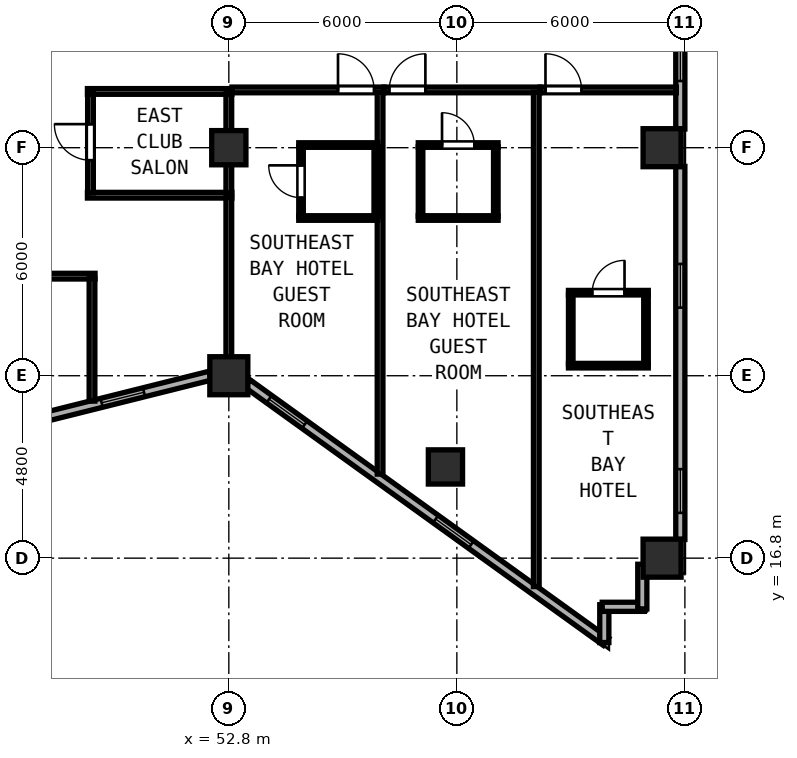
"""IFC4 building model, lengths in metres.
Left out: names, types, materials, properties, quantities, classifications, styles, units other than length and angle.
Written with IfcOpenShell. Run it as: python <this file> out.ifc"""

import sys

from ifc_helpers import new_model, si_unit, direction, frame, frame_2d, origin, origin_2d, place, context, subcontext, project, spatial, rectangle, hollow_rectangle, extrude, element, fill, save


model = new_model("IFC4")
c1 = context("Model", 3, precision=1e-05, world=origin(), true_north=direction((0.0, 1.0)))
c2 = subcontext(c1, "Body", "Model", "MODEL_VIEW")
j1 = project(units=[si_unit("LENGTHUNIT", "METRE"), si_unit("PLANEANGLEUNIT", "RADIAN")], contexts=[c1])
p1 = place(None, origin())
s1 = spatial("IfcSite", under=j1, at=p1, CompositionType="ELEMENT")
p2 = place(p1, origin())
s2 = spatial("IfcBuilding", under=s1, at=p2, CompositionType="ELEMENT")
p3 = place(p2, frame((0.0, 0.0, 121.2)))
s3 = spatial("IfcBuildingStorey", under=s2, at=p3, CompositionType="ELEMENT", Elevation=121.2)
for number, where, z_axis, x_axis in (
    (1, (52.8, 21.6, 0.0), (0.0, 0.0, 1.0), (1.0, 0.0, 0.0)),
    (2, (64.2, 16.8, 0.0), (0.0, 0.0, 1.0), (1.0, 0.0, 0.0)),
    (3, (64.2, 27.6, 0.0), (0.0, 0.0, 1.0), (1.0, 0.0, 0.0)),
):
    element("IfcColumn", number, at=place(p3, frame(where, z_axis=z_axis, x_axis=x_axis)), inside=s3, PredefinedType="COLUMN", context=c2, shape_type="SweptSolid", body=[
        extrude(hollow_rectangle(XDim=1.0, YDim=1.0, WallThickness=0.038, at=origin_2d()), origin(), (0.0, 0.0, 1.0), 3.8),
    ])
for number, where, z_axis, x_axis in (
    (4, (52.8, 27.6, 0.0), (0.0, 0.0, 1.0), (1.0, 0.0, 0.0)),
    (5, (58.5, 19.2, 0.0), (0.0, 0.0, 1.0), (1.0, 0.0, 0.0)),
):
    element("IfcColumn", number, at=place(p3, frame(where, z_axis=z_axis, x_axis=x_axis)), inside=s3, PredefinedType="COLUMN", context=c2, shape_type="SweptSolid", body=[
        extrude(hollow_rectangle(XDim=0.9, YDim=0.9, WallThickness=0.034, at=origin_2d()), origin(), (0.0, 0.0, 1.0), 3.8),
    ])
p4 = place(p3, frame((47.932, 20.507, 0.0), z_axis=(0.0, 0.0, 1.0), x_axis=(0.970145683738, 0.242522890311, 0.0)))
e6 = element("IfcWall", 6, at=p4, inside=s3, PredefinedType="SOLIDWALL", context=c2, shape_type="SweptSolid", body=[
    extrude(rectangle(XDim=4.511, YDim=0.24, at=frame_2d((2.255, 0.0))), origin(), (0.0, 0.0, 1.0), 3.145),
])
p5 = place(p4, frame((1.569, 0.0, 0.85)))
e7 = element("IfcOpeningElement", 7, at=p5, cuts=e6, PredefinedType="OPENING", context=c2, shape_type="SweptSolid", body=[
    extrude(rectangle(XDim=1.15, YDim=1.8, at=frame_2d((0.575, 0.9))), frame((0.0, 0.13, 0.0), z_axis=(0.0, -1.0, 0.0), x_axis=(1.0, 0.0, 0.0)), (0.0, 0.0, 1.0), 0.26),
])
p6 = place(p3, frame((53.292, 21.394, 0.0), z_axis=(0.0, 0.0, 1.0), x_axis=(0.811543504691, -0.584291998913, 0.0)))
e8 = element("IfcWall", 8, at=p6, inside=s3, PredefinedType="SOLIDWALL", context=c2, shape_type="SweptSolid", body=[
    extrude(rectangle(XDim=11.623, YDim=0.24, at=frame_2d((5.812, 0.0))), origin(), (0.0, 0.0, 1.0), 3.145),
])
p7 = place(p6, frame((0.7, 0.0, 0.85)))
e9 = element("IfcOpeningElement", 9, at=p7, cuts=e8, PredefinedType="OPENING", context=c2, shape_type="SweptSolid", body=[
    extrude(rectangle(XDim=1.15, YDim=1.8, at=frame_2d((0.575, 0.9))), frame((0.0, 0.13, 0.0), z_axis=(0.0, -1.0, 0.0), x_axis=(1.0, 0.0, 0.0)), (0.0, 0.0, 1.0), 0.26),
])
p8 = place(p6, frame((6.1, 0.0, 0.85)))
e10 = element("IfcOpeningElement", 10, at=p8, cuts=e8, PredefinedType="OPENING", context=c2, shape_type="SweptSolid", body=[
    extrude(rectangle(XDim=1.15, YDim=1.8, at=frame_2d((0.575, 0.9))), frame((0.0, 0.13, 0.0), z_axis=(0.0, -1.0, 0.0), x_axis=(1.0, 0.0, 0.0)), (0.0, 0.0, 1.0), 0.26),
])
p9 = place(p3, frame((62.68, 14.579, 0.0), z_axis=(0.0, 0.0, 1.0), x_axis=(0.0, 1.0, 0.0)))
e11 = element("IfcWall", 11, at=p9, inside=s3, PredefinedType="SOLIDWALL", context=c2, shape_type="SweptSolid", body=[
    extrude(rectangle(XDim=0.996, YDim=0.24, at=frame_2d((0.498, 0.0))), origin(), (0.0, 0.0, 1.0), 3.6),
])
p10 = place(p3, frame((62.625, 15.52, 0.0), z_axis=(0.0, 0.0, 1.0), x_axis=(1.0, 0.0, 0.0)))
e12 = element("IfcWall", 12, at=p10, inside=s3, PredefinedType="SOLIDWALL", context=c2, shape_type="SweptSolid", body=[
    extrude(rectangle(XDim=1.11, YDim=0.24, at=frame_2d((0.555, 0.0))), origin(), (0.0, 0.0, 1.0), 3.6),
])
p11 = place(p3, frame((63.68, 15.465, 0.0), z_axis=(0.0, 0.0, 1.0), x_axis=(0.0, 1.0, 0.0)))
e13 = element("IfcWall", 13, at=p11, inside=s3, PredefinedType="SOLIDWALL", context=c2, shape_type="SweptSolid", body=[
    extrude(rectangle(XDim=1.175, YDim=0.24, at=frame_2d((0.587, 0.0))), origin(), (0.0, 0.0, 1.0), 3.6),
])
p12 = place(p3, frame((64.68, 17.292, 0.0), z_axis=(0.0, 0.0, 1.0), x_axis=(0.0, 1.0, 0.0)))
e14 = element("IfcWall", 14, at=p12, inside=s3, PredefinedType="SOLIDWALL", context=c2, shape_type="SweptSolid", body=[
    extrude(rectangle(XDim=9.816, YDim=0.24, at=frame_2d((4.908, 0.0))), origin(), (0.0, 0.0, 1.0), 3.6),
])
p13 = place(p12, frame((0.7, 0.0, 0.85)))
e15 = element("IfcOpeningElement", 15, at=p13, cuts=e14, PredefinedType="OPENING", context=c2, shape_type="SweptSolid", body=[
    extrude(rectangle(XDim=1.15, YDim=1.8, at=frame_2d((0.575, 0.9))), frame((0.0, 0.13, 0.0), z_axis=(0.0, -1.0, 0.0), x_axis=(1.0, 0.0, 0.0)), (0.0, 0.0, 1.0), 0.26),
])
p14 = place(p12, frame((6.1, 0.0, 0.85)))
e16 = element("IfcOpeningElement", 16, at=p14, cuts=e14, PredefinedType="OPENING", context=c2, shape_type="SweptSolid", body=[
    extrude(rectangle(XDim=1.15, YDim=1.8, at=frame_2d((0.575, 0.9))), frame((0.0, 0.13, 0.0), z_axis=(0.0, -1.0, 0.0), x_axis=(1.0, 0.0, 0.0)), (0.0, 0.0, 1.0), 0.26),
])
p15 = place(p3, frame((64.68, 28.092, 0.0), z_axis=(0.0, 0.0, 1.0), x_axis=(0.0, 1.0, 0.0)))
e17 = element("IfcWall", 17, at=p15, inside=s3, PredefinedType="SOLIDWALL", context=c2, shape_type="SweptSolid", body=[
    extrude(rectangle(XDim=9.443, YDim=0.24, at=frame_2d((4.721, 0.0))), origin(), (0.0, 0.0, 1.0), 3.6),
])
p16 = place(p15, frame((1.263, 0.0, 0.85)))
e18 = element("IfcOpeningElement", 18, at=p16, cuts=e17, PredefinedType="OPENING", context=c2, shape_type="SweptSolid", body=[
    extrude(rectangle(XDim=1.15, YDim=1.8, at=frame_2d((0.575, 0.9))), frame((0.0, 0.13, 0.0), z_axis=(0.0, -1.0, 0.0), x_axis=(1.0, 0.0, 0.0)), (0.0, 0.0, 1.0), 0.26),
])
p17 = place(p15, frame((6.1, 0.0, 0.85)))
e19 = element("IfcOpeningElement", 19, at=p17, cuts=e17, PredefinedType="OPENING", context=c2, shape_type="SweptSolid", body=[
    extrude(rectangle(XDim=1.15, YDim=1.8, at=frame_2d((0.575, 0.9))), frame((0.0, 0.13, 0.0), z_axis=(0.0, -1.0, 0.0), x_axis=(1.0, 0.0, 0.0)), (0.0, 0.0, 1.0), 0.26),
])
for number, where, z_axis, x_axis in (
    (20, (49.08, 29.08, 0.0), (0.0, 0.0, 1.0), (1.0, 0.0, 0.0)),
    (21, (49.08, 26.35, 0.0), (0.0, 0.0, 1.0), (1.0, 0.0, 0.0)),
):
    element("IfcWall", number, at=place(p3, frame(where, z_axis=z_axis, x_axis=x_axis)), inside=s3, PredefinedType="PARTITIONING", context=c2, shape_type="SweptSolid", body=[
        extrude(rectangle(XDim=3.8, YDim=0.15, at=frame_2d((1.9, 0.0))), origin(), (0.0, 0.0, 1.0), 3.6),
    ])
p18 = place(p3, frame((49.16, 26.41, 0.0), z_axis=(0.0, 0.0, 1.0), x_axis=(0.0, 1.0, 0.0)))
e22 = element("IfcWall", 22, at=p18, inside=s3, PredefinedType="PARTITIONING", context=c2, shape_type="SweptSolid", body=[
    extrude(rectangle(XDim=2.61, YDim=0.15, at=frame_2d((1.305, 0.0))), origin(), (0.0, 0.0, 1.0), 3.6),
])
p19 = place(p18, frame((0.86, 0.0, 0.0)))
e23 = element("IfcOpeningElement", 23, at=p19, cuts=e22, PredefinedType="OPENING", context=c2, shape_type="SweptSolid", body=[
    extrude(rectangle(XDim=0.95, YDim=2.12, at=frame_2d((0.475, 1.06))), frame((0.0, 0.085, 0.0), z_axis=(0.0, -1.0, 0.0), x_axis=(1.0, 0.0, 0.0)), (0.0, 0.0, 1.0), 0.17),
])
p20 = place(p3, frame((52.8, 26.41, 0.0), z_axis=(0.0, 0.0, 1.0), x_axis=(0.0, 1.0, 0.0)))
e24 = element("IfcWall", 24, at=p20, inside=s3, PredefinedType="PARTITIONING", context=c2, shape_type="SweptSolid", body=[
    extrude(rectangle(XDim=2.61, YDim=0.15, at=frame_2d((1.305, 0.0))), origin(), (0.0, 0.0, 1.0), 3.145),
])
p21 = place(p3, frame((45.682, 24.22, 0.0), z_axis=(0.0, 0.0, 1.0), x_axis=(1.0, 0.0, 0.0)))
e25 = element("IfcWall", 25, at=p21, inside=s3, PredefinedType="PARTITIONING", context=c2, shape_type="SweptSolid", body=[
    extrude(rectangle(XDim=3.598, YDim=0.15, at=frame_2d((1.799, 0.0))), origin(), (0.0, 0.0, 1.0), 3.6),
])
p22 = place(p21, frame((2.113, 0.0, 0.0), z_axis=(0.0, 0.0, 1.0), x_axis=(-1.0, 0.0, 0.0)))
e26 = element("IfcOpeningElement", 26, at=p22, cuts=e25, PredefinedType="OPENING", context=c2, shape_type="SweptSolid", body=[
    extrude(rectangle(XDim=0.95, YDim=2.12, at=frame_2d((0.475, 1.06))), frame((0.0, 0.085, 0.0), z_axis=(0.0, -1.0, 0.0), x_axis=(1.0, 0.0, 0.0)), (0.0, 0.0, 1.0), 0.17),
])
p23 = place(p3, frame((49.2, 20.932, 0.0), z_axis=(0.0, 0.0, 1.0), x_axis=(0.0, 1.0, 0.0)))
e27 = element("IfcWall", 27, at=p23, inside=s3, PredefinedType="PARTITIONING", context=c2, shape_type="SweptSolid", body=[
    extrude(rectangle(XDim=3.228, YDim=0.15, at=frame_2d((1.614, 0.0))), origin(), (0.0, 0.0, 1.0), 3.6),
])
p24 = place(p3, frame((52.882, 29.12, 0.0), z_axis=(0.0, 0.0, 1.0), x_axis=(1.0, 0.0, 0.0)))
e28 = element("IfcWall", 28, at=p24, inside=s3, PredefinedType="PARTITIONING", context=c2, shape_type="SweptSolid", body=[
    extrude(rectangle(XDim=3.998, YDim=0.15, at=frame_2d((1.999, 0.0))), origin(), (0.0, 0.0, 1.0), 3.6),
])
p25 = place(p24, frame((3.74, 0.0, 0.0), z_axis=(0.0, 0.0, 1.0), x_axis=(-1.0, 0.0, 0.0)))
e29 = element("IfcOpeningElement", 29, at=p25, cuts=e28, PredefinedType="OPENING", context=c2, shape_type="SweptSolid", body=[
    extrude(rectangle(XDim=0.95, YDim=2.15, at=frame_2d((0.475, 1.075))), frame((0.0, 0.085, 0.0), z_axis=(0.0, -1.0, 0.0), x_axis=(1.0, 0.0, 0.0)), (0.0, 0.0, 1.0), 0.17),
])
p26 = place(p3, frame((52.8, 21.819, 0.0), z_axis=(0.0, 0.0, 1.0), x_axis=(0.0, 1.0, 0.0)))
e30 = element("IfcWall", 30, at=p26, inside=s3, PredefinedType="PARTITIONING", context=c2, shape_type="SweptSolid", body=[
    extrude(rectangle(XDim=4.471, YDim=0.15, at=frame_2d((2.236, 0.0))), origin(), (0.0, 0.0, 1.0), 3.145),
])
p27 = place(p3, frame((56.78, 19.012, 0.0), z_axis=(0.0, 0.0, 1.0), x_axis=(0.0, 1.0, 0.0)))
e31 = element("IfcWall", 31, at=p27, inside=s3, PredefinedType="PARTITIONING", context=c2, shape_type="SweptSolid", body=[
    extrude(rectangle(XDim=10.048, YDim=0.15, at=frame_2d((5.024, 0.0))), origin(), (0.0, 0.0, 1.0), 3.6),
])
p28 = place(p3, frame((54.64, 27.67, 0.0), z_axis=(0.0, 0.0, 1.0), x_axis=(1.0, 0.0, 0.0)))
e32 = element("IfcWall", 32, at=p28, inside=s3, PredefinedType="PARTITIONING", context=c2, shape_type="SweptSolid", body=[
    extrude(rectangle(XDim=2.08, YDim=0.12, at=frame_2d((1.04, 0.0))), origin(), (0.0, 0.0, 1.0), 3.145),
])
p29 = place(p3, frame((54.64, 25.75, 0.0), z_axis=(0.0, 0.0, 1.0), x_axis=(1.0, 0.0, 0.0)))
e33 = element("IfcWall", 33, at=p29, inside=s3, PredefinedType="PARTITIONING", context=c2, shape_type="SweptSolid", body=[
    extrude(rectangle(XDim=2.08, YDim=0.12, at=frame_2d((1.04, 0.0))), origin(), (0.0, 0.0, 1.0), 3.6),
])
p30 = place(p3, frame((54.7, 25.795, 0.0), z_axis=(0.0, 0.0, 1.0), x_axis=(0.0, 1.0, 0.0)))
e34 = element("IfcWall", 34, at=p30, inside=s3, PredefinedType="PARTITIONING", context=c2, shape_type="SweptSolid", body=[
    extrude(rectangle(XDim=1.83, YDim=0.12, at=frame_2d((0.915, 0.0))), origin(), (0.0, 0.0, 1.0), 3.6),
])
p31 = place(p30, frame((1.34, 0.0, 0.0), z_axis=(0.0, 0.0, 1.0), x_axis=(-1.0, 0.0, 0.0)))
e35 = element("IfcOpeningElement", 35, at=p31, cuts=e34, PredefinedType="OPENING", context=c2, shape_type="SweptSolid", body=[
    extrude(rectangle(XDim=0.85, YDim=2.1, at=frame_2d((0.425, 1.05))), frame((0.0, 0.07, 0.0), z_axis=(0.0, -1.0, 0.0), x_axis=(1.0, 0.0, 0.0)), (0.0, 0.0, 1.0), 0.14),
])
p32 = place(p3, frame((56.68, 25.795, 0.0), z_axis=(0.0, 0.0, 1.0), x_axis=(0.0, 1.0, 0.0)))
e36 = element("IfcWall", 36, at=p32, inside=s3, PredefinedType="PARTITIONING", context=c2, shape_type="SweptSolid", body=[
    extrude(rectangle(XDim=1.83, YDim=0.12, at=frame_2d((0.915, 0.0))), origin(), (0.0, 0.0, 1.0), 3.6),
])
p33 = place(p3, frame((56.882, 29.12, 0.0), z_axis=(0.0, 0.0, 1.0), x_axis=(1.0, 0.0, 0.0)))
e37 = element("IfcWall", 37, at=p33, inside=s3, PredefinedType="PARTITIONING", context=c2, shape_type="SweptSolid", body=[
    extrude(rectangle(XDim=4.108, YDim=0.15, at=frame_2d((2.054, 0.0))), origin(), (0.0, 0.0, 1.0), 3.6),
])
p34 = place(p33, frame((1.09, 0.0, 0.0), z_axis=(0.0, 0.0, 1.0), x_axis=(-1.0, 0.0, 0.0)))
e38 = element("IfcOpeningElement", 38, at=p34, cuts=e37, PredefinedType="OPENING", context=c2, shape_type="SweptSolid", body=[
    extrude(rectangle(XDim=0.95, YDim=2.15, at=frame_2d((0.475, 1.075))), frame((0.0, 0.085, 0.0), z_axis=(0.0, -1.0, 0.0), x_axis=(1.0, 0.0, 0.0)), (0.0, 0.0, 1.0), 0.17),
])
p35 = place(p3, frame((60.89, 16.052, 0.0), z_axis=(0.0, 0.0, 1.0), x_axis=(0.0, 1.0, 0.0)))
e39 = element("IfcWall", 39, at=p35, inside=s3, PredefinedType="PARTITIONING", context=c2, shape_type="SweptSolid", body=[
    extrude(rectangle(XDim=13.008, YDim=0.15, at=frame_2d((6.504, 0.0))), origin(), (0.0, 0.0, 1.0), 3.6),
])
p36 = place(p3, frame((57.785, 27.67, 0.0), z_axis=(0.0, 0.0, 1.0), x_axis=(1.0, 0.0, 0.0)))
e40 = element("IfcWall", 40, at=p36, inside=s3, PredefinedType="PARTITIONING", context=c2, shape_type="SweptSolid", body=[
    extrude(rectangle(XDim=2.1, YDim=0.12, at=frame_2d((1.05, 0.0))), origin(), (0.0, 0.0, 1.0), 3.145),
])
p37 = place(p36, frame((1.475, 0.0, 0.0), z_axis=(0.0, 0.0, 1.0), x_axis=(-1.0, 0.0, 0.0)))
e41 = element("IfcOpeningElement", 41, at=p37, cuts=e40, PredefinedType="OPENING", context=c2, shape_type="SweptSolid", body=[
    extrude(rectangle(XDim=0.85, YDim=2.1, at=frame_2d((0.425, 1.05))), frame((0.0, 0.07, 0.0), z_axis=(0.0, -1.0, 0.0), x_axis=(1.0, 0.0, 0.0)), (0.0, 0.0, 1.0), 0.14),
])
p38 = place(p3, frame((57.785, 25.75, 0.0), z_axis=(0.0, 0.0, 1.0), x_axis=(1.0, 0.0, 0.0)))
e42 = element("IfcWall", 42, at=p38, inside=s3, PredefinedType="PARTITIONING", context=c2, shape_type="SweptSolid", body=[
    extrude(rectangle(XDim=2.1, YDim=0.12, at=frame_2d((1.05, 0.0))), origin(), (0.0, 0.0, 1.0), 3.6),
])
for number, where, z_axis, x_axis in (
    (43, (57.845, 25.795, 0.0), (0.0, 0.0, 1.0), (0.0, 1.0, 0.0)),
    (44, (59.825, 25.795, 0.0), (0.0, 0.0, 1.0), (0.0, 1.0, 0.0)),
):
    element("IfcWall", number, at=place(p3, frame(where, z_axis=z_axis, x_axis=x_axis)), inside=s3, PredefinedType="PARTITIONING", context=c2, shape_type="SweptSolid", body=[
        extrude(rectangle(XDim=1.83, YDim=0.12, at=frame_2d((0.915, 0.0))), origin(), (0.0, 0.0, 1.0), 3.6),
    ])
p39 = place(p3, frame((60.992, 29.12, 0.0), z_axis=(0.0, 0.0, 1.0), x_axis=(1.0, 0.0, 0.0)))
e45 = element("IfcWall", 45, at=p39, inside=s3, PredefinedType="PARTITIONING", context=c2, shape_type="SweptSolid", body=[
    extrude(rectangle(XDim=3.583, YDim=0.15, at=frame_2d((1.792, 0.0))), origin(), (0.0, 0.0, 1.0), 3.6),
])
p40 = place(p39, frame((1.09, 0.0, 0.0), z_axis=(0.0, 0.0, 1.0), x_axis=(-1.0, 0.0, 0.0)))
e46 = element("IfcOpeningElement", 46, at=p40, cuts=e45, PredefinedType="OPENING", context=c2, shape_type="SweptSolid", body=[
    extrude(rectangle(XDim=0.95, YDim=2.15, at=frame_2d((0.475, 1.075))), frame((0.0, 0.085, 0.0), z_axis=(0.0, -1.0, 0.0), x_axis=(1.0, 0.0, 0.0)), (0.0, 0.0, 1.0), 0.17),
])
p41 = place(p3, frame((61.737, 23.785, 0.0), z_axis=(0.0, 0.0, 1.0), x_axis=(1.0, 0.0, 0.0)))
e47 = element("IfcWall", 47, at=p41, inside=s3, PredefinedType="PARTITIONING", context=c2, shape_type="SweptSolid", body=[
    extrude(rectangle(XDim=2.1, YDim=0.12, at=frame_2d((1.05, 0.0))), origin(), (0.0, 0.0, 1.0), 3.6),
])
p42 = place(p41, frame((1.475, 0.0, 0.0), z_axis=(0.0, 0.0, 1.0), x_axis=(-1.0, 0.0, 0.0)))
e48 = element("IfcOpeningElement", 48, at=p42, cuts=e47, PredefinedType="OPENING", context=c2, shape_type="SweptSolid", body=[
    extrude(rectangle(XDim=0.85, YDim=2.1, at=frame_2d((0.425, 1.05))), frame((0.0, 0.07, 0.0), z_axis=(0.0, -1.0, 0.0), x_axis=(1.0, 0.0, 0.0)), (0.0, 0.0, 1.0), 0.14),
])
p43 = place(p3, frame((61.737, 21.865, 0.0), z_axis=(0.0, 0.0, 1.0), x_axis=(1.0, 0.0, 0.0)))
e49 = element("IfcWall", 49, at=p43, inside=s3, PredefinedType="PARTITIONING", context=c2, shape_type="SweptSolid", body=[
    extrude(rectangle(XDim=2.1, YDim=0.12, at=frame_2d((1.05, 0.0))), origin(), (0.0, 0.0, 1.0), 3.6),
])
for number, where, z_axis, x_axis in (
    (50, (61.797, 21.91, 0.0), (0.0, 0.0, 1.0), (0.0, 1.0, 0.0)),
    (51, (63.777, 21.91, 0.0), (0.0, 0.0, 1.0), (0.0, 1.0, 0.0)),
):
    element("IfcWall", number, at=place(p3, frame(where, z_axis=z_axis, x_axis=x_axis)), inside=s3, PredefinedType="PARTITIONING", context=c2, shape_type="SweptSolid", body=[
        extrude(rectangle(XDim=1.83, YDim=0.12, at=frame_2d((0.915, 0.0))), origin(), (0.0, 0.0, 1.0), 3.6),
    ])
p44 = place(p5, origin())
e52 = element("IfcWindow", 52, at=p44, inside=s3, PartitioningType="SINGLE_PANEL", PredefinedType="WINDOW", context=c2, shape_type="SweptSolid", body=[
    extrude(rectangle(XDim=1.15, YDim=1.8, at=frame_2d((0.575, 0.9))), frame((0.0, 0.03, 0.0), z_axis=(0.0, -1.0, 0.0), x_axis=(1.0, 0.0, 0.0)), (0.0, 0.0, 1.0), 0.06),
])
fill(e7, e52)
p45 = place(p7, origin())
e53 = element("IfcWindow", 53, at=p45, inside=s3, PartitioningType="SINGLE_PANEL", PredefinedType="WINDOW", context=c2, shape_type="SweptSolid", body=[
    extrude(rectangle(XDim=1.15, YDim=1.8, at=frame_2d((0.575, 0.9))), frame((0.0, 0.03, 0.0), z_axis=(0.0, -1.0, 0.0), x_axis=(1.0, 0.0, 0.0)), (0.0, 0.0, 1.0), 0.06),
])
fill(e9, e53)
p46 = place(p8, origin())
e54 = element("IfcWindow", 54, at=p46, inside=s3, PartitioningType="SINGLE_PANEL", PredefinedType="WINDOW", context=c2, shape_type="SweptSolid", body=[
    extrude(rectangle(XDim=1.15, YDim=1.8, at=frame_2d((0.575, 0.9))), frame((0.0, 0.03, 0.0), z_axis=(0.0, -1.0, 0.0), x_axis=(1.0, 0.0, 0.0)), (0.0, 0.0, 1.0), 0.06),
])
fill(e10, e54)
p47 = place(p13, origin())
e55 = element("IfcWindow", 55, at=p47, inside=s3, PartitioningType="SINGLE_PANEL", PredefinedType="WINDOW", context=c2, shape_type="SweptSolid", body=[
    extrude(rectangle(XDim=1.15, YDim=1.8, at=frame_2d((0.575, 0.9))), frame((0.0, 0.03, 0.0), z_axis=(0.0, -1.0, 0.0), x_axis=(1.0, 0.0, 0.0)), (0.0, 0.0, 1.0), 0.06),
])
fill(e15, e55)
p48 = place(p14, origin())
e56 = element("IfcWindow", 56, at=p48, inside=s3, PartitioningType="SINGLE_PANEL", PredefinedType="WINDOW", context=c2, shape_type="SweptSolid", body=[
    extrude(rectangle(XDim=1.15, YDim=1.8, at=frame_2d((0.575, 0.9))), frame((0.0, 0.03, 0.0), z_axis=(0.0, -1.0, 0.0), x_axis=(1.0, 0.0, 0.0)), (0.0, 0.0, 1.0), 0.06),
])
fill(e16, e56)
p49 = place(p16, origin())
e57 = element("IfcWindow", 57, at=p49, inside=s3, PartitioningType="SINGLE_PANEL", PredefinedType="WINDOW", context=c2, shape_type="SweptSolid", body=[
    extrude(rectangle(XDim=1.15, YDim=1.8, at=frame_2d((0.575, 0.9))), frame((0.0, 0.03, 0.0), z_axis=(0.0, -1.0, 0.0), x_axis=(1.0, 0.0, 0.0)), (0.0, 0.0, 1.0), 0.06),
])
fill(e18, e57)
p50 = place(p19, origin())
e58 = element("IfcDoor", 58, at=p50, inside=s3, OperationType="SINGLE_SWING_RIGHT", PredefinedType="DOOR", context=c2, shape_type="SweptSolid", body=[
    extrude(rectangle(XDim=0.95, YDim=2.12, at=frame_2d((0.475, 1.06))), frame((0.0, 0.025, 0.0), z_axis=(0.0, -1.0, 0.0), x_axis=(1.0, 0.0, 0.0)), (0.0, 0.0, 1.0), 0.05),
])
fill(e23, e58)
p51 = place(p25, origin())
e59 = element("IfcDoor", 59, at=p51, inside=s3, OperationType="SINGLE_SWING_RIGHT", PredefinedType="DOOR", context=c2, shape_type="SweptSolid", body=[
    extrude(rectangle(XDim=0.95, YDim=2.15, at=frame_2d((0.475, 1.075))), frame((0.0, 0.025, 0.0), z_axis=(0.0, -1.0, 0.0), x_axis=(1.0, 0.0, 0.0)), (0.0, 0.0, 1.0), 0.05),
])
fill(e29, e59)
p52 = place(p31, origin())
e60 = element("IfcDoor", 60, at=p52, inside=s3, OperationType="SINGLE_SWING_LEFT", PredefinedType="DOOR", context=c2, shape_type="SweptSolid", body=[
    extrude(rectangle(XDim=0.85, YDim=2.1, at=frame_2d((0.425, 1.05))), frame((0.0, 0.025, 0.0), z_axis=(0.0, -1.0, 0.0), x_axis=(1.0, 0.0, 0.0)), (0.0, 0.0, 1.0), 0.05),
])
fill(e35, e60)
p53 = place(p34, origin())
e61 = element("IfcDoor", 61, at=p53, inside=s3, OperationType="SINGLE_SWING_LEFT", PredefinedType="DOOR", context=c2, shape_type="SweptSolid", body=[
    extrude(rectangle(XDim=0.95, YDim=2.15, at=frame_2d((0.475, 1.075))), frame((0.0, 0.025, 0.0), z_axis=(0.0, -1.0, 0.0), x_axis=(1.0, 0.0, 0.0)), (0.0, 0.0, 1.0), 0.05),
])
fill(e38, e61)
p54 = place(p37, origin())
e62 = element("IfcDoor", 62, at=p54, inside=s3, OperationType="SINGLE_SWING_RIGHT", PredefinedType="DOOR", context=c2, shape_type="SweptSolid", body=[
    extrude(rectangle(XDim=0.85, YDim=2.1, at=frame_2d((0.425, 1.05))), frame((0.0, 0.025, 0.0), z_axis=(0.0, -1.0, 0.0), x_axis=(1.0, 0.0, 0.0)), (0.0, 0.0, 1.0), 0.05),
])
fill(e41, e62)
p55 = place(p40, origin())
e63 = element("IfcDoor", 63, at=p55, inside=s3, OperationType="SINGLE_SWING_RIGHT", PredefinedType="DOOR", context=c2, shape_type="SweptSolid", body=[
    extrude(rectangle(XDim=0.95, YDim=2.15, at=frame_2d((0.475, 1.075))), frame((0.0, 0.025, 0.0), z_axis=(0.0, -1.0, 0.0), x_axis=(1.0, 0.0, 0.0)), (0.0, 0.0, 1.0), 0.05),
])
fill(e46, e63)
p56 = place(p42, origin())
e64 = element("IfcDoor", 64, at=p56, inside=s3, OperationType="SINGLE_SWING_LEFT", PredefinedType="DOOR", context=c2, shape_type="SweptSolid", body=[
    extrude(rectangle(XDim=0.85, YDim=2.1, at=frame_2d((0.425, 1.05))), frame((0.0, 0.025, 0.0), z_axis=(0.0, -1.0, 0.0), x_axis=(1.0, 0.0, 0.0)), (0.0, 0.0, 1.0), 0.05),
])
fill(e48, e64)
save(model, sys.argv[1])
